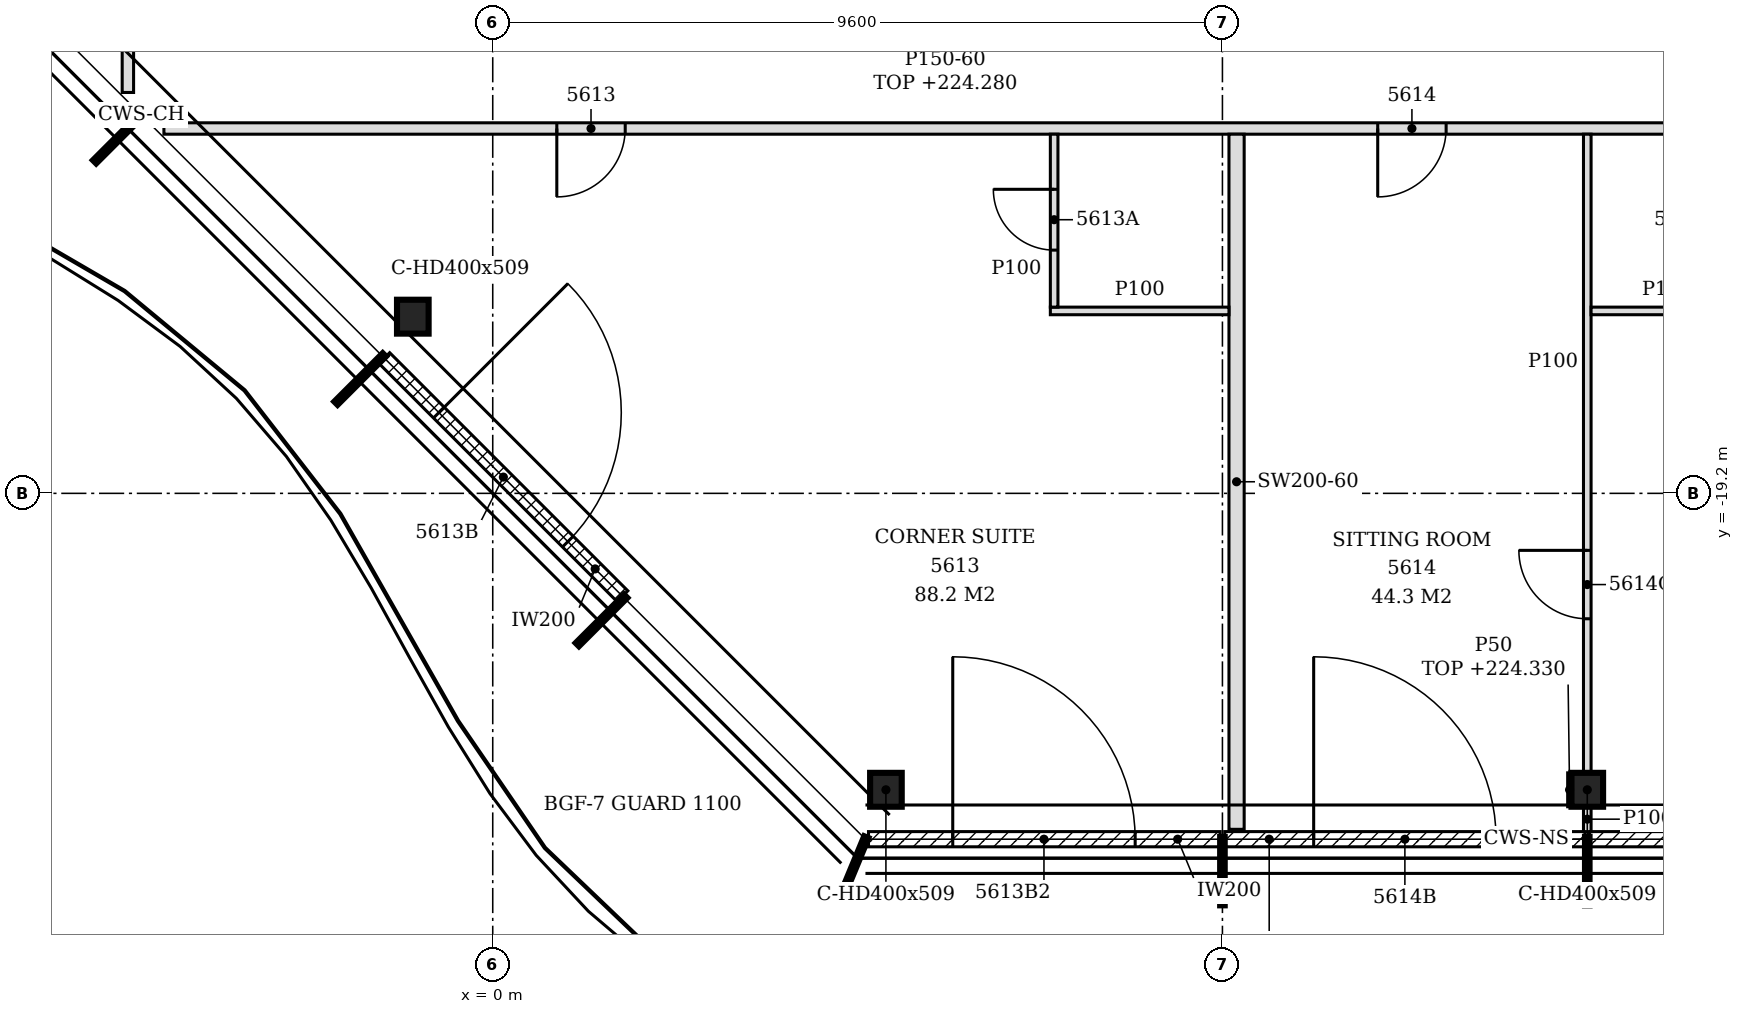
"""IFC4 building model, lengths in metres.
Left out: names, types, materials, properties, quantities, classifications, styles, units other than length and angle.
Written with IfcOpenShell. Run it as: python <this file> out.ifc"""

import sys

from ifc_helpers import new_model, si_unit, direction, frame, frame_2d, origin, origin_2d, place, context, subcontext, project, spatial, polyline, rectangle, i_section, outline, extrude, element, fill, save


model = new_model("IFC4")
c1 = context("Model", 3, precision=1e-05, world=origin(), true_north=direction((0.0, 1.0)))
c2 = subcontext(c1, "Body", "Model", "MODEL_VIEW")
j1 = project(units=[si_unit("LENGTHUNIT", "METRE"), si_unit("PLANEANGLEUNIT", "RADIAN")], contexts=[c1])
p1 = place(None, origin())
s1 = spatial("IfcSite", under=j1, at=p1, CompositionType="ELEMENT")
p2 = place(p1, origin())
s2 = spatial("IfcBuilding", under=s1, at=p2, CompositionType="ELEMENT")
p3 = place(p2, frame((0.0, 0.0, 221.4)))
s3 = spatial("IfcBuildingStorey", under=s2, at=p3, CompositionType="ELEMENT", Elevation=221.4)
for number, where, z_axis, x_axis in (
    (1, (5.173, -23.1, -0.15), (0.0, 0.0, 1.0), (1.0, 0.0, 0.0)),
    (2, (14.4, -23.1, -0.15), (0.0, 0.0, 1.0), (1.0, 0.0, 0.0)),
    (3, (-1.052, -16.876, -0.15), (0.0, 0.0, 1.0), (1.0, 0.0, 0.0)),
):
    element("IfcColumn", number, at=place(p3, frame(where, z_axis=z_axis, x_axis=x_axis)), inside=s3, PredefinedType="COLUMN", context=c2, shape_type="SweptSolid", body=[
        extrude(i_section(OverallWidth=0.416, OverallDepth=0.446, WebThickness=0.039, FlangeThickness=0.063, FilletRadius=0.015, at=origin_2d()), origin(), (0.0, 0.0, 1.0), 3.6),
    ])
p4 = place(p3, frame((4.944, -23.75, 0.0), z_axis=(0.0, 0.0, 1.0), x_axis=(1.0, 0.0, 0.0)))
e4 = element("IfcWall", 4, at=p4, inside=s3, PredefinedType="NOTDEFINED", context=c2, shape_type="SweptSolid", body=[
    extrude(rectangle(XDim=4.626, YDim=0.2, at=frame_2d((2.313, 0.0))), origin(), (0.0, 0.0, 1.0), 3.45),
])
p5 = place(p4, frame((1.108, 0.0, 0.0)))
e5 = element("IfcOpeningElement", 5, at=p5, cuts=e4, PredefinedType="OPENING", context=c2, shape_type="SweptSolid", body=[
    extrude(rectangle(XDim=2.4, YDim=2.4, at=frame_2d((1.2, 1.2))), frame((0.0, 0.11, 0.0), z_axis=(0.0, -1.0, 0.0), x_axis=(1.0, 0.0, 0.0)), (0.0, 0.0, 1.0), 0.22),
])
p6 = place(p3, frame((9.63, -23.75, 0.0), z_axis=(0.0, 0.0, 1.0), x_axis=(1.0, 0.0, 0.0)))
e6 = element("IfcWall", 6, at=p6, inside=s3, PredefinedType="NOTDEFINED", context=c2, shape_type="SweptSolid", body=[
    extrude(rectangle(XDim=4.74, YDim=0.2, at=frame_2d((2.37, 0.0))), origin(), (0.0, 0.0, 1.0), 3.45),
])
p7 = place(p6, frame((1.17, 0.0, 0.0)))
e7 = element("IfcOpeningElement", 7, at=p7, cuts=e6, PredefinedType="OPENING", context=c2, shape_type="SweptSolid", body=[
    extrude(rectangle(XDim=2.4, YDim=2.4, at=frame_2d((1.2, 1.2))), frame((0.0, 0.11, 0.0), z_axis=(0.0, -1.0, 0.0), x_axis=(1.0, 0.0, 0.0)), (0.0, 0.0, 1.0), 0.22),
])
p8 = place(p3, frame((14.43, -23.75, 0.0), z_axis=(0.0, 0.0, 1.0), x_axis=(1.0, 0.0, 0.0)))
e8 = element("IfcWall", 8, at=p8, inside=s3, PredefinedType="NOTDEFINED", context=c2, shape_type="SweptSolid", body=[
    extrude(rectangle(XDim=4.74, YDim=0.2, at=frame_2d((2.37, 0.0))), origin(), (0.0, 0.0, 1.0), 3.45),
])
p9 = place(p8, frame((1.17, 0.0, 0.0)))
e9 = element("IfcOpeningElement", 9, at=p9, cuts=e8, PredefinedType="OPENING", context=c2, shape_type="SweptSolid", body=[
    extrude(rectangle(XDim=2.4, YDim=2.4, at=frame_2d((1.2, 1.2))), frame((0.0, 0.11, 0.0), z_axis=(0.0, -1.0, 0.0), x_axis=(1.0, 0.0, 0.0)), (0.0, 0.0, 1.0), 0.22),
])
p10 = place(p3, frame((-1.427, -17.42, 0.0), z_axis=(0.0, 0.0, 1.0), x_axis=(0.707106781187, -0.707106781187, 0.0)))
e10 = element("IfcWall", 10, at=p10, inside=s3, PredefinedType="NOTDEFINED", context=c2, shape_type="SweptSolid", body=[
    extrude(rectangle(XDim=4.431, YDim=0.2, at=frame_2d((2.216, 0.0))), origin(), (0.0, 0.0, 1.0), 3.45),
])
p11 = place(p10, frame((1.015, 0.0, 0.0)))
e11 = element("IfcOpeningElement", 11, at=p11, cuts=e10, PredefinedType="OPENING", context=c2, shape_type="SweptSolid", body=[
    extrude(rectangle(XDim=2.4, YDim=2.4, at=frame_2d((1.2, 1.2))), frame((0.0, 0.11, 0.0), z_axis=(0.0, -1.0, 0.0), x_axis=(1.0, 0.0, 0.0)), (0.0, 0.0, 1.0), 0.22),
])
p12 = place(p3, frame((14.4, -23.65, 0.0), z_axis=(0.0, 0.0, 1.0), x_axis=(0.0, 1.0, 0.0)))
e12 = element("IfcWall", 12, at=p12, inside=s3, PredefinedType="PARTITIONING", context=c2, shape_type="SweptSolid", body=[
    extrude(rectangle(XDim=0.327, YDim=0.1, at=frame_2d((0.164, 0.0))), origin(), (0.0, 0.0, 1.0), 3.45),
])
p13 = place(p3, frame((9.786, -23.62, 0.0), z_axis=(0.0, 0.0, 1.0), x_axis=(0.0, 1.0, 0.0)))
e13 = element("IfcWall", 13, at=p13, inside=s3, PredefinedType="PARTITIONING", context=c2, shape_type="SweptSolid", body=[
    extrude(outline(polyline([(0.0, 0.0), (9.145, 0.0), (9.145, 2.88), (9.115, 2.88), (9.113, 3.45), (4.525, 3.45), (4.523, 2.88), (4.315, 2.88), (4.313, 3.45), (0.67, 3.45), (0.668, 2.93), (0.37, 2.93), (0.368, 3.45), (0.0, 3.45), (0.0, 0.0)])), frame((0.0, 0.1, 0.0), z_axis=(0.0, -1.0, 0.0), x_axis=(1.0, 0.0, 0.0)), (0.0, 0.0, 1.0), 0.2),
])
p14 = place(p3, frame((14.4, -22.877, 0.0), z_axis=(0.0, 0.0, 1.0), x_axis=(0.0, 1.0, 0.0)))
e14 = element("IfcWall", 14, at=p14, inside=s3, PredefinedType="PARTITIONING", context=c2, shape_type="SweptSolid", body=[
    extrude(outline(polyline([(0.0, 0.0), (8.402, 0.0), (8.402, 2.88), (8.372, 2.88), (8.37, 3.45), (3.782, 3.45), (3.78, 2.88), (3.572, 2.88), (3.57, 3.45), (0.0, 3.45), (0.0, 0.0)])), frame((0.0, 0.05, 0.0), z_axis=(0.0, -1.0, 0.0), x_axis=(1.0, 0.0, 0.0)), (0.0, 0.0, 1.0), 0.1),
])
p15 = place(p14, frame((2.027, 0.0, 0.0)))
e15 = element("IfcOpeningElement", 15, at=p15, cuts=e14, PredefinedType="OPENING", context=c2, shape_type="SweptSolid", body=[
    extrude(rectangle(XDim=0.9, YDim=2.1, at=frame_2d((0.45, 1.05))), frame((0.0, 0.06, 0.0), z_axis=(0.0, -1.0, 0.0), x_axis=(1.0, 0.0, 0.0)), (0.0, 0.0, 1.0), 0.12),
])
p16 = place(p3, frame((7.336, -16.8, 0.0), z_axis=(0.0, 0.0, 1.0), x_axis=(1.0, 0.0, 0.0)))
e16 = element("IfcWall", 16, at=p16, inside=s3, PredefinedType="PARTITIONING", context=c2, shape_type="SweptSolid", body=[
    extrude(outline(polyline([(0.0, 0.0), (2.35, 0.0), (2.35, 3.45), (0.014, 3.45), (0.012, 2.73), (0.0, 2.73), (0.0, 0.0)])), frame((0.0, 0.05, 0.0), z_axis=(0.0, -1.0, 0.0), x_axis=(1.0, 0.0, 0.0)), (0.0, 0.0, 1.0), 0.1),
])
p17 = place(p3, frame((7.386, -16.75, 0.0), z_axis=(0.0, 0.0, 1.0), x_axis=(0.0, 1.0, 0.0)))
e17 = element("IfcWall", 17, at=p17, inside=s3, PredefinedType="PARTITIONING", context=c2, shape_type="SweptSolid", body=[
    extrude(outline(polyline([(0.0, 0.0), (2.275, 0.0), (2.275, 2.88), (2.245, 2.88), (2.243, 3.45), (0.0, 3.45), (0.0, 0.0)])), frame((0.0, 0.05, 0.0), z_axis=(0.0, -1.0, 0.0), x_axis=(1.0, 0.0, 0.0)), (0.0, 0.0, 1.0), 0.1),
])
p18 = place(p17, frame((0.75, 0.0, 0.0)))
e18 = element("IfcOpeningElement", 18, at=p18, cuts=e17, PredefinedType="OPENING", context=c2, shape_type="SweptSolid", body=[
    extrude(rectangle(XDim=0.8, YDim=2.1, at=frame_2d((0.4, 1.05))), frame((0.0, 0.06, 0.0), z_axis=(0.0, -1.0, 0.0), x_axis=(1.0, 0.0, 0.0)), (0.0, 0.0, 1.0), 0.12),
])
p19 = place(p3, frame((14.45, -16.8, 0.0), z_axis=(0.0, 0.0, 1.0), x_axis=(1.0, 0.0, 0.0)))
e19 = element("IfcWall", 19, at=p19, inside=s3, PredefinedType="PARTITIONING", context=c2, shape_type="SweptSolid", body=[
    extrude(rectangle(XDim=2.0, YDim=0.1, at=frame_2d((1.0, 0.0))), origin(), (0.0, 0.0, 1.0), 3.45),
])
p20 = place(p3, frame((-4.326, -14.4, 0.0), z_axis=(0.0, 0.0, 1.0), x_axis=(1.0, 0.0, 0.0)))
e20 = element("IfcWall", 20, at=p20, inside=s3, PredefinedType="PARTITIONING", context=c2, shape_type="SweptSolid", body=[
    extrude(outline(polyline([(0.0, 0.0), (21.026, 0.0), (21.026, 2.88), (11.676, 2.88), (11.674, 2.73), (11.376, 2.73), (11.374, 2.88), (1.369, 2.88), (1.367, 2.63), (0.229, 2.63), (0.227, 2.88), (0.0, 2.88), (0.0, 0.0)])), frame((0.0, 0.075, 0.0), z_axis=(0.0, -1.0, 0.0), x_axis=(1.0, 0.0, 0.0)), (0.0, 0.0, 1.0), 0.15),
])
p21 = place(p20, frame((5.169, 0.0, 0.0)))
e21 = element("IfcOpeningElement", 21, at=p21, cuts=e20, PredefinedType="OPENING", context=c2, shape_type="SweptSolid", body=[
    extrude(rectangle(XDim=0.9, YDim=2.1, at=frame_2d((0.45, 1.05))), frame((0.0, 0.085, 0.0), z_axis=(0.0, -1.0, 0.0), x_axis=(1.0, 0.0, 0.0)), (0.0, 0.0, 1.0), 0.17),
])
p22 = place(p20, frame((15.969, 0.0, 0.0)))
e22 = element("IfcOpeningElement", 22, at=p22, cuts=e20, PredefinedType="OPENING", context=c2, shape_type="SweptSolid", body=[
    extrude(rectangle(XDim=0.9, YDim=2.1, at=frame_2d((0.45, 1.05))), frame((0.0, 0.085, 0.0), z_axis=(0.0, -1.0, 0.0), x_axis=(1.0, 0.0, 0.0)), (0.0, 0.0, 1.0), 0.17),
])
p23 = place(p3, frame((-4.8, -13.926, 0.0), z_axis=(0.0, 0.0, 1.0), x_axis=(0.0, 1.0, 0.0)))
e23 = element("IfcWall", 23, at=p23, inside=s3, PredefinedType="PARTITIONING", context=c2, shape_type="SweptSolid", body=[
    extrude(outline(polyline([(0.0, 0.0), (2.92, 0.0), (2.92, 3.03), (1.369, 3.03), (1.367, 2.63), (0.229, 2.63), (0.227, 3.03), (0.0, 3.03), (0.0, 0.0)])), frame((0.0, 0.075, 0.0), z_axis=(0.0, -1.0, 0.0), x_axis=(1.0, 0.0, 0.0)), (0.0, 0.0, 1.0), 0.15),
])
p24 = place(p3, frame((14.167, -23.323, 0.0), z_axis=(0.0, 0.0, 1.0), x_axis=(0.0, 1.0, 0.0)))
e24 = element("IfcWall", 24, at=p24, inside=s3, PredefinedType="PARTITIONING", context=c2, shape_type="SweptSolid", body=[
    extrude(rectangle(XDim=0.446, YDim=0.05, at=frame_2d((0.223, 0.0))), origin(), (0.0, 0.0, 1.0), 2.93),
])
p25 = place(p5, origin())
e25 = element("IfcDoor", 25, at=p25, inside=s3, OperationType="SINGLE_SWING_LEFT", PredefinedType="DOOR", context=c2, shape_type="SweptSolid", body=[
    extrude(rectangle(XDim=2.4, YDim=2.4, at=frame_2d((1.2, 1.2))), frame((0.0, 0.025, 0.0), z_axis=(0.0, -1.0, 0.0), x_axis=(1.0, 0.0, 0.0)), (0.0, 0.0, 1.0), 0.05),
])
fill(e5, e25)
p26 = place(p7, origin())
e26 = element("IfcDoor", 26, at=p26, inside=s3, OperationType="SINGLE_SWING_LEFT", PredefinedType="DOOR", context=c2, shape_type="SweptSolid", body=[
    extrude(rectangle(XDim=2.4, YDim=2.4, at=frame_2d((1.2, 1.2))), frame((0.0, 0.025, 0.0), z_axis=(0.0, -1.0, 0.0), x_axis=(1.0, 0.0, 0.0)), (0.0, 0.0, 1.0), 0.05),
])
fill(e7, e26)
p27 = place(p11, origin())
e27 = element("IfcDoor", 27, at=p27, inside=s3, OperationType="SINGLE_SWING_LEFT", PredefinedType="DOOR", context=c2, shape_type="SweptSolid", body=[
    extrude(rectangle(XDim=2.4, YDim=2.4, at=frame_2d((1.2, 1.2))), frame((0.0, 0.025, 0.0), z_axis=(0.0, -1.0, 0.0), x_axis=(1.0, 0.0, 0.0)), (0.0, 0.0, 1.0), 0.05),
])
fill(e11, e27)
p28 = place(p21, frame((0.9, 0.0, 0.0), z_axis=(0.0, 0.0, 1.0), x_axis=(-1.0, 0.0, 0.0)))
e28 = element("IfcDoor", 28, at=p28, inside=s3, OperationType="SINGLE_SWING_RIGHT", PredefinedType="DOOR", context=c2, shape_type="SweptSolid", body=[
    extrude(rectangle(XDim=0.9, YDim=2.1, at=frame_2d((0.45, 1.05))), frame((0.0, 0.025, 0.0), z_axis=(0.0, -1.0, 0.0), x_axis=(1.0, 0.0, 0.0)), (0.0, 0.0, 1.0), 0.05),
])
fill(e21, e28)
p29 = place(p18, origin())
e29 = element("IfcDoor", 29, at=p29, inside=s3, OperationType="SINGLE_SWING_RIGHT", PredefinedType="DOOR", context=c2, shape_type="SweptSolid", body=[
    extrude(rectangle(XDim=0.8, YDim=2.1, at=frame_2d((0.4, 1.05))), frame((0.0, 0.025, 0.0), z_axis=(0.0, -1.0, 0.0), x_axis=(1.0, 0.0, 0.0)), (0.0, 0.0, 1.0), 0.05),
])
fill(e18, e29)
p30 = place(p22, frame((0.9, 0.0, 0.0), z_axis=(0.0, 0.0, 1.0), x_axis=(-1.0, 0.0, 0.0)))
e30 = element("IfcDoor", 30, at=p30, inside=s3, OperationType="SINGLE_SWING_RIGHT", PredefinedType="DOOR", context=c2, shape_type="SweptSolid", body=[
    extrude(rectangle(XDim=0.9, YDim=2.1, at=frame_2d((0.45, 1.05))), frame((0.0, 0.025, 0.0), z_axis=(0.0, -1.0, 0.0), x_axis=(1.0, 0.0, 0.0)), (0.0, 0.0, 1.0), 0.05),
])
fill(e22, e30)
p31 = place(p15, origin())
e31 = element("IfcDoor", 31, at=p31, inside=s3, OperationType="SINGLE_SWING_RIGHT", PredefinedType="DOOR", context=c2, shape_type="SweptSolid", body=[
    extrude(rectangle(XDim=0.9, YDim=2.1, at=frame_2d((0.45, 1.05))), frame((0.0, 0.025, 0.0), z_axis=(0.0, -1.0, 0.0), x_axis=(1.0, 0.0, 0.0)), (0.0, 0.0, 1.0), 0.05),
])
fill(e15, e31)
save(model, sys.argv[1])
